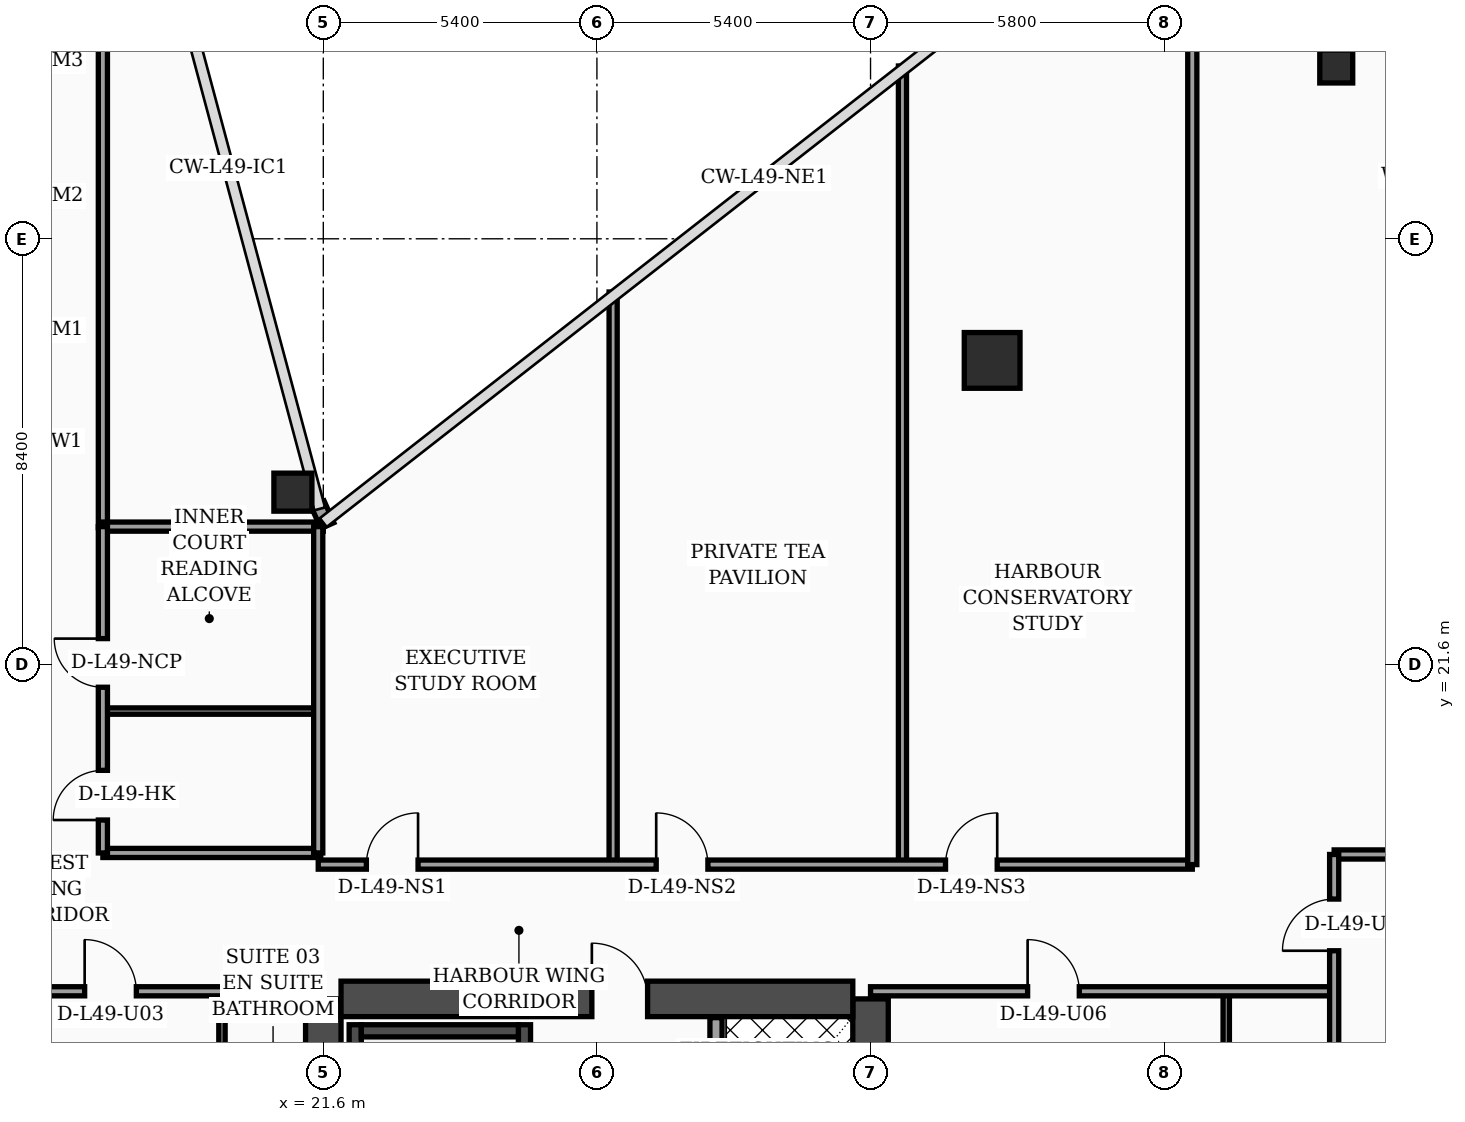
"""IFC4 building model, lengths in metres.
Left out: names, types, materials, properties, quantities, classifications, styles, units other than length and angle.
Written with IfcOpenShell. Run it as: python <this file> out.ifc"""

import sys

from ifc_helpers import new_model, si_unit, direction, frame, frame_2d, origin, origin_2d, place, context, subcontext, project, spatial, rectangle, hollow_rectangle, circle, extrude, element, fill, save


model = new_model("IFC4")
c1 = context("Model", 3, precision=1e-05, world=origin(), true_north=direction((0.0, 1.0)))
c2 = subcontext(c1, "Body", "Model", "MODEL_VIEW")
j1 = project(units=[si_unit("LENGTHUNIT", "METRE"), si_unit("PLANEANGLEUNIT", "RADIAN")], contexts=[c1])
p1 = place(None, origin())
s1 = spatial("IfcSite", under=j1, at=p1, CompositionType="ELEMENT")
p2 = place(p1, origin())
s2 = spatial("IfcBuilding", under=s1, at=p2, CompositionType="ELEMENT")
p3 = place(p2, frame((0.0, 0.0, 199.6)))
s3 = spatial("IfcBuildingStorey", under=s2, at=p3, CompositionType="ELEMENT", Elevation=199.6)
for number, where, z_axis, x_axis in (
    (1, (21.6, 4.6, 0.0), (0.0, 0.0, 1.0), (0.0, 1.0, 0.0)),
    (2, (32.4, 4.6, 0.0), (0.0, 0.0, 1.0), (0.0, 1.0, 0.0)),
):
    element("IfcWall", number, at=place(p3, frame(where, z_axis=z_axis, x_axis=x_axis)), inside=s3, PredefinedType="SHEAR", context=c2, shape_type="SweptSolid", body=[
        extrude(rectangle(XDim=10.4, YDim=0.7, at=frame_2d((5.2, 0.0))), origin(), (0.0, 0.0, 1.0), 3.56),
    ])
p4 = place(p3, frame((21.95, 15.0, 0.0), z_axis=(0.0, 0.0, 1.0), x_axis=(1.0, 0.0, 0.0)))
e3 = element("IfcWall", 3, at=p4, inside=s3, PredefinedType="SHEAR", context=c2, shape_type="SweptSolid", body=[
    extrude(rectangle(XDim=10.1, YDim=0.7, at=frame_2d((5.05, 0.0))), origin(), (0.0, 0.0, 1.0), 3.56),
])
p5 = place(p4, frame((4.95, 0.0, 0.0)))
e4 = element("IfcOpeningElement", 4, at=p5, cuts=e3, PredefinedType="OPENING", context=c2, shape_type="SweptSolid", body=[
    extrude(rectangle(XDim=1.1, YDim=2.2, at=frame_2d((0.55, 1.1))), frame((0.0, 0.36, 0.0), z_axis=(0.0, -1.0, 0.0), x_axis=(1.0, 0.0, 0.0)), (0.0, 0.0, 1.0), 0.72),
])
p6 = place(p3, frame((22.23, 4.95, 0.0), z_axis=(0.0, 0.0, 1.0), x_axis=(0.0, 1.0, 0.0)))
e5 = element("IfcWall", 5, at=p6, inside=s3, PredefinedType="SOLIDWALL", context=c2, shape_type="SweptSolid", body=[
    extrude(rectangle(XDim=9.54, YDim=0.24, at=frame_2d((4.77, 0.0))), origin(), (0.0, 0.0, 1.0), 3.56),
])
p7 = place(p3, frame((25.57, 4.95, 0.0), z_axis=(0.0, 0.0, 1.0), x_axis=(0.0, 1.0, 0.0)))
e6 = element("IfcWall", 6, at=p7, inside=s3, PredefinedType="SOLIDWALL", context=c2, shape_type="SweptSolid", body=[
    extrude(rectangle(XDim=9.54, YDim=0.24, at=frame_2d((4.77, 0.0))), origin(), (0.0, 0.0, 1.0), 3.56),
])
p8 = place(p7, frame((0.35, 0.0, 0.0)))
e7 = element("IfcOpeningElement", 7, at=p8, cuts=e6, PredefinedType="OPENING", context=c2, shape_type="SweptSolid", body=[
    extrude(rectangle(XDim=1.15, YDim=2.2, at=frame_2d((0.575, 1.1))), frame((0.0, 0.13, 0.0), z_axis=(0.0, -1.0, 0.0), x_axis=(1.0, 0.0, 0.0)), (0.0, 0.0, 1.0), 0.26),
])
p9 = place(p3, frame((22.35, 14.37, 0.0), z_axis=(0.0, 0.0, 1.0), x_axis=(1.0, 0.0, 0.0)))
e8 = element("IfcWall", 8, at=p9, inside=s3, PredefinedType="SOLIDWALL", context=c2, shape_type="SweptSolid", body=[
    extrude(rectangle(XDim=3.1, YDim=0.24, at=frame_2d((1.55, 0.0))), origin(), (0.0, 0.0, 1.0), 3.56),
])
p10 = place(p3, frame((21.0, 25.0, 0.0), z_axis=(0.0, 0.0, 1.0), x_axis=(1.0, 0.0, 0.0)))
e9 = element("IfcColumn", 9, at=p10, inside=s3, PredefinedType="COLUMN", context=c2, shape_type="SweptSolid", body=[
    extrude(hollow_rectangle(XDim=0.75, YDim=0.75, WallThickness=0.032, at=origin_2d()), origin(), (0.0, 0.0, 1.0), 3.56),
])
p11 = place(p3, frame((34.8, 27.6, 0.0), z_axis=(0.0, 0.0, 1.0), x_axis=(1.0, 0.0, 0.0)))
e10 = element("IfcColumn", 10, at=p11, inside=s3, PredefinedType="COLUMN", context=c2, shape_type="SweptSolid", body=[
    extrude(circle(Radius=0.55, at=origin_2d()), origin(), (0.0, 0.0, 1.0), 3.56),
])
p12 = place(p3, frame((41.591, 33.4, 0.0), z_axis=(0.0, 0.0, 1.0), x_axis=(1.0, 0.0, 0.0)))
e11 = element("IfcColumn", 11, at=p12, inside=s3, PredefinedType="COLUMN", context=c2, shape_type="SweptSolid", body=[
    extrude(hollow_rectangle(XDim=0.65, YDim=0.65, WallThickness=0.028, at=origin_2d()), origin(), (0.0, 0.0, 1.0), 3.56),
])
p13 = place(p3, frame((21.68, 24.34, 0.0), z_axis=(0.0, 0.0, 1.0), x_axis=(-0.40758134973, 0.913168901875, 0.0)))
e12 = element("IfcWall", 12, at=p13, inside=s3, PredefinedType="SOLIDWALL", context=c2, shape_type="SweptSolid", body=[
    extrude(rectangle(XDim=0.471, YDim=0.28, at=frame_2d((0.235, 0.0))), origin(), (0.0, 0.0, 1.0), 3.56),
])
p14 = place(p3, frame((29.35, 4.97, 0.0), z_axis=(0.0, 0.0, 1.0), x_axis=(0.0, 1.0, 0.0)))
e13 = element("IfcWall", 13, at=p14, inside=s3, PredefinedType="SOLIDWALL", context=c2, shape_type="SweptSolid", body=[
    extrude(rectangle(XDim=9.66, YDim=0.24, at=frame_2d((4.83, 0.0))), origin(), (0.0, 0.0, 1.0), 3.56),
])
p15 = place(p14, frame((0.55, 0.0, 0.0)))
e14 = element("IfcOpeningElement", 14, at=p15, cuts=e13, PredefinedType="OPENING", context=c2, shape_type="SweptSolid", body=[
    extrude(rectangle(XDim=1.3, YDim=2.35, at=frame_2d((0.65, 1.175))), frame((0.0, 0.13, 0.0), z_axis=(0.0, -1.0, 0.0), x_axis=(1.0, 0.0, 0.0)), (0.0, 0.0, 1.0), 0.26),
])
p16 = place(p3, frame((19.6, 2.44, 0.0), z_axis=(0.0, 0.0, 1.0), x_axis=(0.0, 1.0, 0.0)))
e15 = element("IfcWall", 15, at=p16, inside=s3, PredefinedType="PARTITIONING", context=c2, shape_type="SweptSolid", body=[
    extrude(rectangle(XDim=12.71, YDim=0.125, at=frame_2d((6.355, 0.0))), origin(), (0.0, 0.0, 1.0), 2.59),
])
p17 = place(p16, frame((4.34, 0.0, 0.0)))
e16 = element("IfcOpeningElement", 16, at=p17, cuts=e15, PredefinedType="OPENING", context=c2, shape_type="SweptSolid", body=[
    extrude(rectangle(XDim=0.96, YDim=2.2, at=frame_2d((0.48, 1.1))), frame((0.0, 0.073, 0.0), z_axis=(0.0, -1.0, 0.0), x_axis=(1.0, 0.0, 0.0)), (0.0, 0.0, 1.0), 0.145),
])
p18 = place(p16, frame((10.18, 0.0, 0.0)))
e17 = element("IfcOpeningElement", 17, at=p18, cuts=e15, PredefinedType="OPENING", context=c2, shape_type="SweptSolid", body=[
    extrude(rectangle(XDim=0.9, YDim=2.15, at=frame_2d((0.45, 1.075))), frame((0.0, 0.073, 0.0), z_axis=(0.0, -1.0, 0.0), x_axis=(1.0, 0.0, 0.0)), (0.0, 0.0, 1.0), 0.145),
])
p19 = place(p3, frame((15.15, 15.15, 0.0), z_axis=(0.0, 0.0, 1.0), x_axis=(1.0, 0.0, 0.0)))
e18 = element("IfcWall", 18, at=p19, inside=s3, PredefinedType="PARTITIONING", context=c2, shape_type="SweptSolid", body=[
    extrude(rectangle(XDim=6.45, YDim=0.18, at=frame_2d((3.225, 0.0))), origin(), (0.0, 0.0, 1.0), 2.59),
])
p20 = place(p19, frame((1.74, 0.0, 0.0)))
e19 = element("IfcOpeningElement", 19, at=p20, cuts=e18, PredefinedType="OPENING", context=c2, shape_type="SweptSolid", body=[
    extrude(rectangle(XDim=1.02, YDim=2.2, at=frame_2d((0.51, 1.1))), frame((0.0, 0.1, 0.0), z_axis=(0.0, -1.0, 0.0), x_axis=(1.0, 0.0, 0.0)), (0.0, 0.0, 1.0), 0.2),
])
p21 = place(p3, frame((17.25, 24.3, 0.0), z_axis=(0.0, 0.0, 1.0), x_axis=(0.0, 1.0, 0.0)))
e20 = element("IfcWall", 20, at=p21, inside=s3, PredefinedType="PARTITIONING", context=c2, shape_type="SweptSolid", body=[
    extrude(rectangle(XDim=18.15, YDim=0.18, at=frame_2d((9.075, 0.0))), origin(), (0.0, 0.0, 1.0), 2.94),
])
p22 = place(p3, frame((17.25, 17.88, 0.0), z_axis=(0.0, 0.0, 1.0), x_axis=(1.0, 0.0, 0.0)))
e21 = element("IfcWall", 21, at=p22, inside=s3, PredefinedType="PARTITIONING", context=c2, shape_type="SweptSolid", body=[
    extrude(rectangle(XDim=4.3, YDim=0.18, at=frame_2d((2.15, 0.0))), origin(), (0.0, 0.0, 1.0), 3.09),
])
p23 = place(p3, frame((17.25, 20.68, 0.0), z_axis=(0.0, 0.0, 1.0), x_axis=(1.0, 0.0, 0.0)))
e22 = element("IfcWall", 22, at=p23, inside=s3, PredefinedType="PARTITIONING", context=c2, shape_type="SweptSolid", body=[
    extrude(rectangle(XDim=4.3, YDim=0.125, at=frame_2d((2.15, 0.0))), origin(), (0.0, 0.0, 1.0), 3.56),
])
p24 = place(p3, frame((17.25, 24.32, 0.0), z_axis=(0.0, 0.0, 1.0), x_axis=(1.0, 0.0, 0.0)))
e23 = element("IfcWall", 23, at=p24, inside=s3, PredefinedType="PARTITIONING", context=c2, shape_type="SweptSolid", body=[
    extrude(rectangle(XDim=4.35, YDim=0.18, at=frame_2d((2.175, 0.0))), origin(), (0.0, 0.0, 1.0), 3.56),
])
p25 = place(p3, frame((21.5, 17.88, 0.0), z_axis=(0.0, 0.0, 1.0), x_axis=(0.0, 1.0, 0.0)))
e24 = element("IfcWall", 24, at=p25, inside=s3, PredefinedType="PARTITIONING", context=c2, shape_type="SweptSolid", body=[
    extrude(rectangle(XDim=6.44, YDim=0.18, at=frame_2d((3.22, 0.0))), origin(), (0.0, 0.0, 1.0), 3.09),
])
p26 = place(p3, frame((17.25, 17.88, 0.0), z_axis=(0.0, 0.0, 1.0), x_axis=(0.0, 1.0, 0.0)))
e25 = element("IfcWall", 25, at=p26, inside=s3, PredefinedType="PARTITIONING", context=c2, shape_type="SweptSolid", body=[
    extrude(rectangle(XDim=6.44, YDim=0.18, at=frame_2d((3.22, 0.0))), origin(), (0.0, 0.0, 1.0), 3.09),
])
p27 = place(p26, frame((0.65, 0.0, 0.0)))
e26 = element("IfcOpeningElement", 26, at=p27, cuts=e25, PredefinedType="OPENING", context=c2, shape_type="SweptSolid", body=[
    extrude(rectangle(XDim=0.98, YDim=2.15, at=frame_2d((0.49, 1.075))), frame((0.0, 0.1, 0.0), z_axis=(0.0, -1.0, 0.0), x_axis=(1.0, 0.0, 0.0)), (0.0, 0.0, 1.0), 0.2),
])
p28 = place(p26, frame((3.27, 0.0, 0.0)))
e27 = element("IfcOpeningElement", 27, at=p28, cuts=e25, PredefinedType="OPENING", context=c2, shape_type="SweptSolid", body=[
    extrude(rectangle(XDim=0.96, YDim=2.2, at=frame_2d((0.48, 1.1))), frame((0.0, 0.1, 0.0), z_axis=(0.0, -1.0, 0.0), x_axis=(1.0, 0.0, 0.0)), (0.0, 0.0, 1.0), 0.2),
])
p29 = place(p3, frame((39.42, 2.44, 0.0), z_axis=(0.0, 0.0, 1.0), x_axis=(0.0, 1.0, 0.0)))
e28 = element("IfcWall", 28, at=p29, inside=s3, PredefinedType="PARTITIONING", context=c2, shape_type="SweptSolid", body=[
    extrude(rectangle(XDim=12.71, YDim=0.125, at=frame_2d((6.355, 0.0))), origin(), (0.0, 0.0, 1.0), 2.94),
])
p30 = place(p29, frame((4.35, 0.0, 0.0)))
e29 = element("IfcOpeningElement", 29, at=p30, cuts=e28, PredefinedType="OPENING", context=c2, shape_type="SweptSolid", body=[
    extrude(rectangle(XDim=0.96, YDim=2.2, at=frame_2d((0.48, 1.1))), frame((0.0, 0.073, 0.0), z_axis=(0.0, -1.0, 0.0), x_axis=(1.0, 0.0, 0.0)), (0.0, 0.0, 1.0), 0.145),
])
p31 = place(p29, frame((10.21, 0.0, 0.0)))
e30 = element("IfcOpeningElement", 30, at=p31, cuts=e28, PredefinedType="OPENING", context=c2, shape_type="SweptSolid", body=[
    extrude(rectangle(XDim=0.9, YDim=2.15, at=frame_2d((0.45, 1.075))), frame((0.0, 0.073, 0.0), z_axis=(0.0, -1.0, 0.0), x_axis=(1.0, 0.0, 0.0)), (0.0, 0.0, 1.0), 0.145),
])
p32 = place(p3, frame((32.4, 15.15, 0.0), z_axis=(0.0, 0.0, 1.0), x_axis=(1.0, 0.0, 0.0)))
e31 = element("IfcWall", 31, at=p32, inside=s3, PredefinedType="PARTITIONING", context=c2, shape_type="SweptSolid", body=[
    extrude(rectangle(XDim=9.15, YDim=0.18, at=frame_2d((4.575, 0.0))), origin(), (0.0, 0.0, 1.0), 2.94),
])
p33 = place(p32, frame((3.1, 0.0, 0.0)))
e32 = element("IfcOpeningElement", 32, at=p33, cuts=e31, PredefinedType="OPENING", context=c2, shape_type="SweptSolid", body=[
    extrude(rectangle(XDim=1.02, YDim=2.2, at=frame_2d((0.51, 1.1))), frame((0.0, 0.1, 0.0), z_axis=(0.0, -1.0, 0.0), x_axis=(1.0, 0.0, 0.0)), (0.0, 0.0, 1.0), 0.2),
])
p34 = place(p3, frame((27.32, 17.65, 0.0), z_axis=(0.0, 0.0, 1.0), x_axis=(0.0, 1.0, 0.0)))
e33 = element("IfcWall", 33, at=p34, inside=s3, PredefinedType="PARTITIONING", context=c2, shape_type="SweptSolid", body=[
    extrude(rectangle(XDim=11.3, YDim=0.16, at=frame_2d((5.65, 0.0))), origin(), (0.0, 0.0, 1.0), 2.94),
])
p35 = place(p3, frame((33.03, 17.65, 0.0), z_axis=(0.0, 0.0, 1.0), x_axis=(0.0, 1.0, 0.0)))
e34 = element("IfcWall", 34, at=p35, inside=s3, PredefinedType="PARTITIONING", context=c2, shape_type="SweptSolid", body=[
    extrude(rectangle(XDim=15.76, YDim=0.16, at=frame_2d((7.88, 0.0))), origin(), (0.0, 0.0, 1.0), 2.94),
])
p36 = place(p3, frame((21.5, 17.65, 0.0), z_axis=(0.0, 0.0, 1.0), x_axis=(1.0, 0.0, 0.0)))
e35 = element("IfcWall", 35, at=p36, inside=s3, PredefinedType="PARTITIONING", context=c2, shape_type="SweptSolid", body=[
    extrude(rectangle(XDim=17.25, YDim=0.18, at=frame_2d((8.625, 0.0))), origin(), (0.0, 0.0, 1.0), 2.94),
])
p37 = place(p36, frame((0.95, 0.0, 0.0)))
e36 = element("IfcOpeningElement", 36, at=p37, cuts=e35, PredefinedType="OPENING", context=c2, shape_type="SweptSolid", body=[
    extrude(rectangle(XDim=1.02, YDim=2.2, at=frame_2d((0.51, 1.1))), frame((0.0, 0.1, 0.0), z_axis=(0.0, -1.0, 0.0), x_axis=(1.0, 0.0, 0.0)), (0.0, 0.0, 1.0), 0.2),
])
p38 = place(p36, frame((6.67, 0.0, 0.0)))
e37 = element("IfcOpeningElement", 37, at=p38, cuts=e35, PredefinedType="OPENING", context=c2, shape_type="SweptSolid", body=[
    extrude(rectangle(XDim=1.02, YDim=2.2, at=frame_2d((0.51, 1.1))), frame((0.0, 0.1, 0.0), z_axis=(0.0, -1.0, 0.0), x_axis=(1.0, 0.0, 0.0)), (0.0, 0.0, 1.0), 0.2),
])
p39 = place(p36, frame((12.38, 0.0, 0.0)))
e38 = element("IfcOpeningElement", 38, at=p39, cuts=e35, PredefinedType="OPENING", context=c2, shape_type="SweptSolid", body=[
    extrude(rectangle(XDim=1.02, YDim=2.2, at=frame_2d((0.51, 1.1))), frame((0.0, 0.1, 0.0), z_axis=(0.0, -1.0, 0.0), x_axis=(1.0, 0.0, 0.0)), (0.0, 0.0, 1.0), 0.2),
])
p40 = place(p3, frame((38.75, 17.65, 0.0), z_axis=(0.0, 0.0, 1.0), x_axis=(0.0, 1.0, 0.0)))
e39 = element("IfcWall", 39, at=p40, inside=s3, PredefinedType="PARTITIONING", context=c2, shape_type="SweptSolid", body=[
    extrude(rectangle(XDim=20.23, YDim=0.18, at=frame_2d((10.115, 0.0))), origin(), (0.0, 0.0, 1.0), 2.94),
])
p41 = place(p3, frame((41.55, 17.85, 0.0), z_axis=(0.0, 0.0, 1.0), x_axis=(1.0, 0.0, 0.0)))
e40 = element("IfcWall", 40, at=p41, inside=s3, PredefinedType="PARTITIONING", context=c2, shape_type="SweptSolid", body=[
    extrude(rectangle(XDim=6.73, YDim=0.18, at=frame_2d((3.365, 0.0))), origin(), (0.0, 0.0, 1.0), 2.94),
])
p42 = place(p3, frame((41.55, 2.44, 0.0), z_axis=(0.0, 0.0, 1.0), x_axis=(0.0, 1.0, 0.0)))
e41 = element("IfcWall", 41, at=p42, inside=s3, PredefinedType="PARTITIONING", context=c2, shape_type="SweptSolid", body=[
    extrude(rectangle(XDim=15.41, YDim=0.18, at=frame_2d((7.705, 0.0))), origin(), (0.0, 0.0, 1.0), 2.94),
])
p43 = place(p42, frame((13.51, 0.0, 0.0)))
e42 = element("IfcOpeningElement", 42, at=p43, cuts=e41, PredefinedType="OPENING", context=c2, shape_type="SweptSolid", body=[
    extrude(rectangle(XDim=1.02, YDim=2.2, at=frame_2d((0.51, 1.1))), frame((0.0, 0.1, 0.0), z_axis=(0.0, -1.0, 0.0), x_axis=(1.0, 0.0, 0.0)), (0.0, 0.0, 1.0), 0.2),
])
p44 = place(p20, origin())
e43 = element("IfcDoor", 43, at=p44, inside=s3, OperationType="SINGLE_SWING_LEFT", PredefinedType="DOOR", context=c2, shape_type="SweptSolid", body=[
    extrude(rectangle(XDim=1.02, YDim=2.2, at=frame_2d((0.51, 1.1))), frame((0.0, 0.025, 0.0), z_axis=(0.0, -1.0, 0.0), x_axis=(1.0, 0.0, 0.0)), (0.0, 0.0, 1.0), 0.05),
])
fill(e19, e43)
p45 = place(p27, origin())
e44 = element("IfcDoor", 44, at=p45, inside=s3, OperationType="SINGLE_SWING_LEFT", PredefinedType="DOOR", context=c2, shape_type="SweptSolid", body=[
    extrude(rectangle(XDim=0.98, YDim=2.15, at=frame_2d((0.49, 1.075))), frame((0.0, 0.025, 0.0), z_axis=(0.0, -1.0, 0.0), x_axis=(1.0, 0.0, 0.0)), (0.0, 0.0, 1.0), 0.05),
])
fill(e26, e44)
p46 = place(p28, origin())
e45 = element("IfcDoor", 45, at=p46, inside=s3, OperationType="SINGLE_SWING_RIGHT", PredefinedType="DOOR", context=c2, shape_type="SweptSolid", body=[
    extrude(rectangle(XDim=0.96, YDim=2.2, at=frame_2d((0.48, 1.1))), frame((0.0, 0.025, 0.0), z_axis=(0.0, -1.0, 0.0), x_axis=(1.0, 0.0, 0.0)), (0.0, 0.0, 1.0), 0.05),
])
fill(e27, e45)
p47 = place(p33, origin())
e46 = element("IfcDoor", 46, at=p47, inside=s3, OperationType="SINGLE_SWING_LEFT", PredefinedType="DOOR", context=c2, shape_type="SweptSolid", body=[
    extrude(rectangle(XDim=1.02, YDim=2.2, at=frame_2d((0.51, 1.1))), frame((0.0, 0.025, 0.0), z_axis=(0.0, -1.0, 0.0), x_axis=(1.0, 0.0, 0.0)), (0.0, 0.0, 1.0), 0.05),
])
fill(e32, e46)
p48 = place(p37, origin())
e47 = element("IfcDoor", 47, at=p48, inside=s3, OperationType="SINGLE_SWING_RIGHT", PredefinedType="DOOR", context=c2, shape_type="SweptSolid", body=[
    extrude(rectangle(XDim=1.02, YDim=2.2, at=frame_2d((0.51, 1.1))), frame((0.0, 0.025, 0.0), z_axis=(0.0, -1.0, 0.0), x_axis=(1.0, 0.0, 0.0)), (0.0, 0.0, 1.0), 0.05),
])
fill(e36, e47)
p49 = place(p38, origin())
e48 = element("IfcDoor", 48, at=p49, inside=s3, OperationType="SINGLE_SWING_LEFT", PredefinedType="DOOR", context=c2, shape_type="SweptSolid", body=[
    extrude(rectangle(XDim=1.02, YDim=2.2, at=frame_2d((0.51, 1.1))), frame((0.0, 0.025, 0.0), z_axis=(0.0, -1.0, 0.0), x_axis=(1.0, 0.0, 0.0)), (0.0, 0.0, 1.0), 0.05),
])
fill(e37, e48)
p50 = place(p39, origin())
e49 = element("IfcDoor", 49, at=p50, inside=s3, OperationType="SINGLE_SWING_RIGHT", PredefinedType="DOOR", context=c2, shape_type="SweptSolid", body=[
    extrude(rectangle(XDim=1.02, YDim=2.2, at=frame_2d((0.51, 1.1))), frame((0.0, 0.025, 0.0), z_axis=(0.0, -1.0, 0.0), x_axis=(1.0, 0.0, 0.0)), (0.0, 0.0, 1.0), 0.05),
])
fill(e38, e49)
p51 = place(p43, origin())
e50 = element("IfcDoor", 50, at=p51, inside=s3, OperationType="SINGLE_SWING_LEFT", PredefinedType="DOOR", context=c2, shape_type="SweptSolid", body=[
    extrude(rectangle(XDim=1.02, YDim=2.2, at=frame_2d((0.51, 1.1))), frame((0.0, 0.025, 0.0), z_axis=(0.0, -1.0, 0.0), x_axis=(1.0, 0.0, 0.0)), (0.0, 0.0, 1.0), 0.05),
])
fill(e42, e50)
p52 = place(p5, origin())
e51 = element("IfcDoor", 51, at=p52, inside=s3, OperationType="SINGLE_SWING_LEFT", PredefinedType="DOOR", context=c2, shape_type="SweptSolid", body=[
    extrude(rectangle(XDim=1.1, YDim=2.2, at=frame_2d((0.55, 1.1))), frame((0.0, 0.025, 0.0), z_axis=(0.0, -1.0, 0.0), x_axis=(1.0, 0.0, 0.0)), (0.0, 0.0, 1.0), 0.05),
])
fill(e4, e51)
save(model, sys.argv[1])
